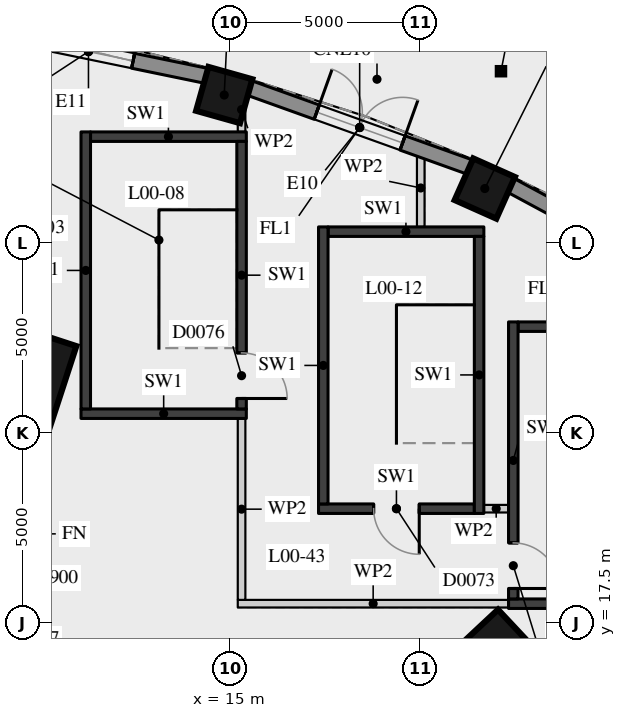
"""IFC4 building model, lengths in metres.
Left out: names, types, materials, properties, quantities, classifications, styles, units other than length and angle.
Written with IfcOpenShell. Run it as: python <this file> out.ifc"""

import sys

from ifc_helpers import new_model, si_unit, direction, frame, frame_2d, origin, origin_2d, place, context, subcontext, project, spatial, rectangle, hollow_circle, extrude, element, fill, save


model = new_model("IFC4")
c1 = context("Model", 3, precision=1e-05, world=origin(), true_north=direction((0.0, 1.0)))
c2 = subcontext(c1, "Body", "Model", "MODEL_VIEW")
j1 = project(units=[si_unit("LENGTHUNIT", "METRE"), si_unit("PLANEANGLEUNIT", "RADIAN")], contexts=[c1])
p1 = place(None, origin())
s1 = spatial("IfcSite", under=j1, at=p1, CompositionType="ELEMENT")
p2 = place(p1, origin())
s2 = spatial("IfcBuilding", under=s1, at=p2, CompositionType="ELEMENT")
p3 = place(p2, origin())
s3 = spatial("IfcBuildingStorey", under=s2, at=p3, CompositionType="ELEMENT", Elevation=0.0)
for number, where, z_axis, x_axis in (
    (1, (21.641, 16.23, 0.0), (0.0, 0.0, 1.0), (0.73, 0.683, 0.0)),
    (2, (9.662, 23.727, 0.0), (0.0, 0.0, 1.0), (0.31, 0.951, 0.0)),
):
    element("IfcColumn", number, at=place(p3, frame(where, z_axis=z_axis, x_axis=x_axis)), inside=s3, PredefinedType="COLUMN", context=c2, shape_type="SweptSolid", body=[
        extrude(rectangle(XDim=2.8, YDim=1.8, at=origin_2d()), origin(), (0.0, 0.0, 1.0), 7.5),
    ])
for number, where, z_axis, x_axis in (
    (3, (21.7, 28.925, 0.0), (0.0, 0.0, 1.0), (0.407, 0.913, 0.0)),
    (4, (14.844, 31.386, 0.0), (0.0, 0.0, 1.0), (0.271, 0.963, 0.0)),
):
    element("IfcColumn", number, at=place(p3, frame(where, z_axis=z_axis, x_axis=x_axis)), inside=s3, PredefinedType="COLUMN", context=c2, shape_type="SweptSolid", body=[
        extrude(rectangle(XDim=1.2, YDim=1.2, at=origin_2d()), origin(), (0.0, 0.0, 1.0), 7.5),
    ])
p4 = place(p3, frame((27.611, 26.192, 0.0), z_axis=(0.0, 0.0, 1.0), x_axis=(-0.880313157301, 0.474393028072, 0.0)))
e5 = element("IfcWall", 5, at=p4, inside=s3, PredefinedType="SOLIDWALL", context=c2, shape_type="SweptSolid", body=[
    extrude(rectangle(XDim=5.958, YDim=0.4, at=frame_2d((2.979, 0.0))), origin(), (0.0, 0.0, 1.0), 6.19),
])
p5 = place(p4, frame((1.779, 0.0, 0.0)))
e6 = element("IfcOpeningElement", 6, at=p5, cuts=e5, PredefinedType="OPENING", context=c2, shape_type="SweptSolid", body=[
    extrude(rectangle(XDim=2.4, YDim=2.2, at=frame_2d((1.2, 1.1))), frame((0.0, 0.21, 0.0), z_axis=(0.0, -1.0, 0.0), x_axis=(1.0, 0.0, 0.0)), (0.0, 0.0, 1.0), 0.42),
])
p6 = place(p4, frame((1.779, 0.0, 2.6)))
e7 = element("IfcOpeningElement", 7, at=p6, cuts=e5, PredefinedType="OPENING", context=c2, shape_type="SweptSolid", body=[
    extrude(rectangle(XDim=2.4, YDim=3.49, at=frame_2d((1.2, 1.745))), frame((0.0, 0.21, 0.0), z_axis=(0.0, -1.0, 0.0), x_axis=(1.0, 0.0, 0.0)), (0.0, 0.0, 1.0), 0.42),
])
p7 = place(p3, frame((21.325, 29.483, 0.0), z_axis=(0.0, 0.0, 1.0), x_axis=(-0.941225814421, 0.337777983694, 0.0)))
e8 = element("IfcWall", 8, at=p7, inside=s3, PredefinedType="SOLIDWALL", context=c2, shape_type="SweptSolid", body=[
    extrude(rectangle(XDim=6.199, YDim=0.4, at=frame_2d((3.1, 0.0))), origin(), (0.0, 0.0, 1.0), 6.19),
])
p8 = place(p7, frame((1.9, 0.0, 0.0)))
e9 = element("IfcOpeningElement", 9, at=p8, cuts=e8, PredefinedType="OPENING", context=c2, shape_type="SweptSolid", body=[
    extrude(rectangle(XDim=2.4, YDim=2.2, at=frame_2d((1.2, 1.1))), frame((0.0, 0.21, 0.0), z_axis=(0.0, -1.0, 0.0), x_axis=(1.0, 0.0, 0.0)), (0.0, 0.0, 1.0), 0.42),
])
p9 = place(p7, frame((1.9, 0.0, 2.6)))
e10 = element("IfcOpeningElement", 10, at=p9, cuts=e8, PredefinedType="OPENING", context=c2, shape_type="SweptSolid", body=[
    extrude(rectangle(XDim=2.4, YDim=3.49, at=frame_2d((1.2, 1.745))), frame((0.0, 0.21, 0.0), z_axis=(0.0, -1.0, 0.0), x_axis=(1.0, 0.0, 0.0)), (0.0, 0.0, 1.0), 0.42),
])
p10 = place(p3, frame((22.126, 32.012, -0.2), z_axis=(0.0, 0.0, 1.0), x_axis=(1.0, 0.0, 0.0)))
e11 = element("IfcColumn", 11, at=p10, inside=s3, PredefinedType="COLUMN", context=c2, shape_type="SweptSolid", body=[
    extrude(hollow_circle(Radius=0.084, WallThickness=0.008, at=origin_2d()), origin(), (0.0, 0.0, 1.0), 4.755),
])
p11 = place(p3, frame((14.392, 31.886, 0.0), z_axis=(0.0, 0.0, 1.0), x_axis=(-0.979388896242, 0.201983637746, 0.0)))
e12 = element("IfcWall", 12, at=p11, inside=s3, PredefinedType="SOLIDWALL", context=c2, shape_type="SweptSolid", body=[
    extrude(rectangle(XDim=6.374, YDim=0.4, at=frame_2d((3.187, 0.0))), origin(), (0.0, 0.0, 1.0), 6.19),
])
p12 = place(p11, frame((1.987, 0.0, 0.0)))
e13 = element("IfcOpeningElement", 13, at=p12, cuts=e12, PredefinedType="OPENING", context=c2, shape_type="SweptSolid", body=[
    extrude(rectangle(XDim=2.4, YDim=2.2, at=frame_2d((1.2, 1.1))), frame((0.0, 0.21, 0.0), z_axis=(0.0, -1.0, 0.0), x_axis=(1.0, 0.0, 0.0)), (0.0, 0.0, 1.0), 0.42),
])
p13 = place(p11, frame((1.987, 0.0, 2.6)))
e14 = element("IfcOpeningElement", 14, at=p13, cuts=e12, PredefinedType="OPENING", context=c2, shape_type="SweptSolid", body=[
    extrude(rectangle(XDim=2.4, YDim=3.49, at=frame_2d((1.2, 1.745))), frame((0.0, 0.21, 0.0), z_axis=(0.0, -1.0, 0.0), x_axis=(1.0, 0.0, 0.0)), (0.0, 0.0, 1.0), 0.42),
])
p14 = place(p3, frame((15.2, 18.0, 0.0), z_axis=(0.0, 0.0, 1.0), x_axis=(1.0, 0.0, 0.0)))
e15 = element("IfcWall", 15, at=p14, inside=s3, PredefinedType="PARTITIONING", context=c2, shape_type="SweptSolid", body=[
    extrude(rectangle(XDim=7.125, YDim=0.2, at=frame_2d((3.562, 0.0))), origin(), (0.0, 0.0, 1.0), 7.09),
])
p15 = place(p3, frame((22.325, 18.0, 0.0), z_axis=(0.0, 0.0, 1.0), x_axis=(1.0, 0.0, 0.0)))
e16 = element("IfcWall", 16, at=p15, inside=s3, PredefinedType="SOLIDWALL", context=c2, shape_type="SweptSolid", body=[
    extrude(rectangle(XDim=4.35, YDim=0.25, at=frame_2d((2.175, 0.0))), origin(), (0.0, 0.0, 1.0), 7.09),
])
p16 = place(p3, frame((17.325, 20.5, 0.0), z_axis=(0.0, 0.0, 1.0), x_axis=(1.0, 0.0, 0.0)))
e17 = element("IfcWall", 17, at=p16, inside=s3, PredefinedType="SOLIDWALL", context=c2, shape_type="SweptSolid", body=[
    extrude(rectangle(XDim=4.1, YDim=0.25, at=frame_2d((2.05, 0.0))), origin(), (0.0, 0.0, 1.0), 7.09),
])
p17 = place(p16, frame((1.45, 0.0, 0.0)))
e18 = element("IfcOpeningElement", 18, at=p17, cuts=e17, PredefinedType="OPENING", context=c2, shape_type="SweptSolid", body=[
    extrude(rectangle(XDim=1.2, YDim=2.1, at=frame_2d((0.6, 1.05))), frame((0.0, 0.135, 0.0), z_axis=(0.0, -1.0, 0.0), x_axis=(1.0, 0.0, 0.0)), (0.0, 0.0, 1.0), 0.27),
])
p18 = place(p3, frame((21.675, 20.5, 0.0), z_axis=(0.0, 0.0, 1.0), x_axis=(1.0, 0.0, 0.0)))
e19 = element("IfcWall", 19, at=p18, inside=s3, PredefinedType="PARTITIONING", context=c2, shape_type="SweptSolid", body=[
    extrude(rectangle(XDim=0.65, YDim=0.2, at=frame_2d((0.325, 0.0))), origin(), (0.0, 0.0, 1.0), 7.09),
])
p19 = place(p3, frame((11.075, 23.0, 0.0), z_axis=(0.0, 0.0, 1.0), x_axis=(1.0, 0.0, 0.0)))
e20 = element("IfcWall", 20, at=p19, inside=s3, PredefinedType="SOLIDWALL", context=c2, shape_type="SweptSolid", body=[
    extrude(rectangle(XDim=4.35, YDim=0.25, at=frame_2d((2.175, 0.0))), origin(), (0.0, 0.0, 1.0), 7.09),
])
p20 = place(p3, frame((22.575, 25.29, 0.0), z_axis=(0.0, 0.0, 1.0), x_axis=(1.0, 0.0, 0.0)))
e21 = element("IfcWall", 21, at=p20, inside=s3, PredefinedType="SOLIDWALL", context=c2, shape_type="SweptSolid", body=[
    extrude(rectangle(XDim=4.676, YDim=0.25, at=frame_2d((2.338, 0.0))), origin(), (0.0, 0.0, 1.0), 7.09),
])
for number, where, z_axis, x_axis in (
    (22, (17.575, 27.79, 0.0), (0.0, 0.0, 1.0), (1.0, 0.0, 0.0)),
    (23, (11.325, 30.29, 0.0), (0.0, 0.0, 1.0), (1.0, 0.0, 0.0)),
):
    element("IfcWall", number, at=place(p3, frame(where, z_axis=z_axis, x_axis=x_axis)), inside=s3, PredefinedType="SOLIDWALL", context=c2, shape_type="SweptSolid", body=[
        extrude(rectangle(XDim=4.1, YDim=0.25, at=frame_2d((2.05, 0.0))), origin(), (0.0, 0.0, 1.0), 7.09),
    ])
p21 = place(p3, frame((11.2, 23.125, 0.0), z_axis=(0.0, 0.0, 1.0), x_axis=(0.0, 1.0, 0.0)))
e24 = element("IfcWall", 24, at=p21, inside=s3, PredefinedType="SOLIDWALL", context=c2, shape_type="SweptSolid", body=[
    extrude(rectangle(XDim=7.29, YDim=0.25, at=frame_2d((3.645, 0.0))), origin(), (0.0, 0.0, 1.0), 7.09),
])
p22 = place(p3, frame((15.3, 18.1, 0.0), z_axis=(0.0, 0.0, 1.0), x_axis=(0.0, 1.0, 0.0)))
e25 = element("IfcWall", 25, at=p22, inside=s3, PredefinedType="PARTITIONING", context=c2, shape_type="SweptSolid", body=[
    extrude(rectangle(XDim=4.775, YDim=0.2, at=frame_2d((2.387, 0.0))), origin(), (0.0, 0.0, 1.0), 7.09),
])
p23 = place(p3, frame((15.3, 23.125, 0.0), z_axis=(0.0, 0.0, 1.0), x_axis=(0.0, 1.0, 0.0)))
e26 = element("IfcWall", 26, at=p23, inside=s3, PredefinedType="SOLIDWALL", context=c2, shape_type="SweptSolid", body=[
    extrude(rectangle(XDim=7.04, YDim=0.25, at=frame_2d((3.52, 0.0))), origin(), (0.0, 0.0, 1.0), 7.09),
])
p24 = place(p23, frame((0.275, 0.0, 0.0)))
e27 = element("IfcOpeningElement", 27, at=p24, cuts=e26, PredefinedType="OPENING", context=c2, shape_type="SweptSolid", body=[
    extrude(rectangle(XDim=1.2, YDim=2.1, at=frame_2d((0.6, 1.05))), frame((0.0, 0.135, 0.0), z_axis=(0.0, -1.0, 0.0), x_axis=(1.0, 0.0, 0.0)), (0.0, 0.0, 1.0), 0.27),
])
p25 = place(p3, frame((15.3, 30.415, 0.0), z_axis=(0.0, 0.0, 1.0), x_axis=(0.0, 1.0, 0.0)))
e28 = element("IfcWall", 28, at=p25, inside=s3, PredefinedType="PARTITIONING", context=c2, shape_type="SweptSolid", body=[
    extrude(rectangle(XDim=1.174, YDim=0.2, at=frame_2d((0.587, 0.0))), origin(), (0.0, 0.0, 1.0), 7.09),
])
p26 = place(p3, frame((17.45, 20.625, 0.0), z_axis=(0.0, 0.0, 1.0), x_axis=(0.0, 1.0, 0.0)))
e29 = element("IfcWall", 29, at=p26, inside=s3, PredefinedType="SOLIDWALL", context=c2, shape_type="SweptSolid", body=[
    extrude(rectangle(XDim=7.29, YDim=0.25, at=frame_2d((3.645, 0.0))), origin(), (0.0, 0.0, 1.0), 7.09),
])
p27 = place(p3, frame((20.014, 27.915, 0.0), z_axis=(0.0, 0.0, 1.0), x_axis=(0.0, 1.0, 0.0)))
e30 = element("IfcWall", 30, at=p27, inside=s3, PredefinedType="PARTITIONING", context=c2, shape_type="SweptSolid", body=[
    extrude(rectangle(XDim=2.05, YDim=0.2, at=frame_2d((1.025, 0.0))), origin(), (0.0, 0.0, 1.0), 7.09),
])
p28 = place(p3, frame((21.55, 20.375, 0.0), z_axis=(0.0, 0.0, 1.0), x_axis=(0.0, 1.0, 0.0)))
e31 = element("IfcWall", 31, at=p28, inside=s3, PredefinedType="SOLIDWALL", context=c2, shape_type="SweptSolid", body=[
    extrude(rectangle(XDim=7.29, YDim=0.25, at=frame_2d((3.645, 0.0))), origin(), (0.0, 0.0, 1.0), 7.09),
])
p29 = place(p3, frame((22.45, 18.125, 0.0), z_axis=(0.0, 0.0, 1.0), x_axis=(0.0, 1.0, 0.0)))
e32 = element("IfcWall", 32, at=p29, inside=s3, PredefinedType="SOLIDWALL", context=c2, shape_type="SweptSolid", body=[
    extrude(rectangle(XDim=7.29, YDim=0.25, at=frame_2d((3.645, 0.0))), origin(), (0.0, 0.0, 1.0), 7.09),
])
p30 = place(p29, frame((0.275, 0.0, 0.0)))
e33 = element("IfcOpeningElement", 33, at=p30, cuts=e32, PredefinedType="OPENING", context=c2, shape_type="SweptSolid", body=[
    extrude(rectangle(XDim=1.2, YDim=2.1, at=frame_2d((0.6, 1.05))), frame((0.0, 0.135, 0.0), z_axis=(0.0, -1.0, 0.0), x_axis=(1.0, 0.0, 0.0)), (0.0, 0.0, 1.0), 0.27),
])
p31 = place(p8, frame((2.4, 0.0, 0.0), z_axis=(0.0, 0.0, 1.0), x_axis=(-1.0, 0.0, 0.0)))
e34 = element("IfcDoor", 34, at=p31, inside=s3, OperationType="DOUBLE_DOOR_SINGLE_SWING", PredefinedType="DOOR", context=c2, shape_type="SweptSolid", body=[
    extrude(rectangle(XDim=2.4, YDim=2.2, at=frame_2d((1.2, 1.1))), frame((0.0, 0.05, 0.0), z_axis=(0.0, -1.0, 0.0), x_axis=(1.0, 0.0, 0.0)), (0.0, 0.0, 1.0), 0.05),
])
fill(e9, e34)
p32 = place(p9, origin())
e35 = element("IfcWindow", 35, at=p32, inside=s3, PartitioningType="SINGLE_PANEL", PredefinedType="WINDOW", context=c2, shape_type="SweptSolid", body=[
    extrude(rectangle(XDim=2.4, YDim=3.49, at=frame_2d((1.2, 1.745))), frame((0.0, 0.01, 0.0), z_axis=(0.0, -1.0, 0.0), x_axis=(1.0, 0.0, 0.0)), (0.0, 0.0, 1.0), 0.06),
])
fill(e10, e35)
p33 = place(p12, frame((2.4, 0.0, 0.0), z_axis=(0.0, 0.0, 1.0), x_axis=(-1.0, 0.0, 0.0)))
e36 = element("IfcDoor", 36, at=p33, inside=s3, OperationType="DOUBLE_DOOR_SINGLE_SWING", PredefinedType="DOOR", context=c2, shape_type="SweptSolid", body=[
    extrude(rectangle(XDim=2.4, YDim=2.2, at=frame_2d((1.2, 1.1))), frame((0.0, 0.05, 0.0), z_axis=(0.0, -1.0, 0.0), x_axis=(1.0, 0.0, 0.0)), (0.0, 0.0, 1.0), 0.05),
])
fill(e13, e36)
p34 = place(p13, origin())
e37 = element("IfcWindow", 37, at=p34, inside=s3, PartitioningType="SINGLE_PANEL", PredefinedType="WINDOW", context=c2, shape_type="SweptSolid", body=[
    extrude(rectangle(XDim=2.4, YDim=3.49, at=frame_2d((1.2, 1.745))), frame((0.0, 0.01, 0.0), z_axis=(0.0, -1.0, 0.0), x_axis=(1.0, 0.0, 0.0)), (0.0, 0.0, 1.0), 0.06),
])
fill(e14, e37)
p35 = place(p17, origin())
e38 = element("IfcDoor", 38, at=p35, inside=s3, OperationType="SINGLE_SWING_LEFT", PredefinedType="DOOR", context=c2, shape_type="SweptSolid", body=[
    extrude(rectangle(XDim=1.2, YDim=2.1, at=frame_2d((0.6, 1.05))), frame((0.0, 0.025, 0.0), z_axis=(0.0, -1.0, 0.0), x_axis=(1.0, 0.0, 0.0)), (0.0, 0.0, 1.0), 0.05),
])
fill(e18, e38)
p36 = place(p24, origin())
e39 = element("IfcDoor", 39, at=p36, inside=s3, OperationType="SINGLE_SWING_RIGHT", PredefinedType="DOOR", context=c2, shape_type="SweptSolid", body=[
    extrude(rectangle(XDim=1.2, YDim=2.1, at=frame_2d((0.6, 1.05))), frame((0.0, 0.025, 0.0), z_axis=(0.0, -1.0, 0.0), x_axis=(1.0, 0.0, 0.0)), (0.0, 0.0, 1.0), 0.05),
])
fill(e27, e39)
p37 = place(p30, origin())
e40 = element("IfcDoor", 40, at=p37, inside=s3, OperationType="SINGLE_SWING_RIGHT", PredefinedType="DOOR", context=c2, shape_type="SweptSolid", body=[
    extrude(rectangle(XDim=1.2, YDim=2.1, at=frame_2d((0.6, 1.05))), frame((0.0, 0.025, 0.0), z_axis=(0.0, -1.0, 0.0), x_axis=(1.0, 0.0, 0.0)), (0.0, 0.0, 1.0), 0.05),
])
fill(e33, e40)
save(model, sys.argv[1])
